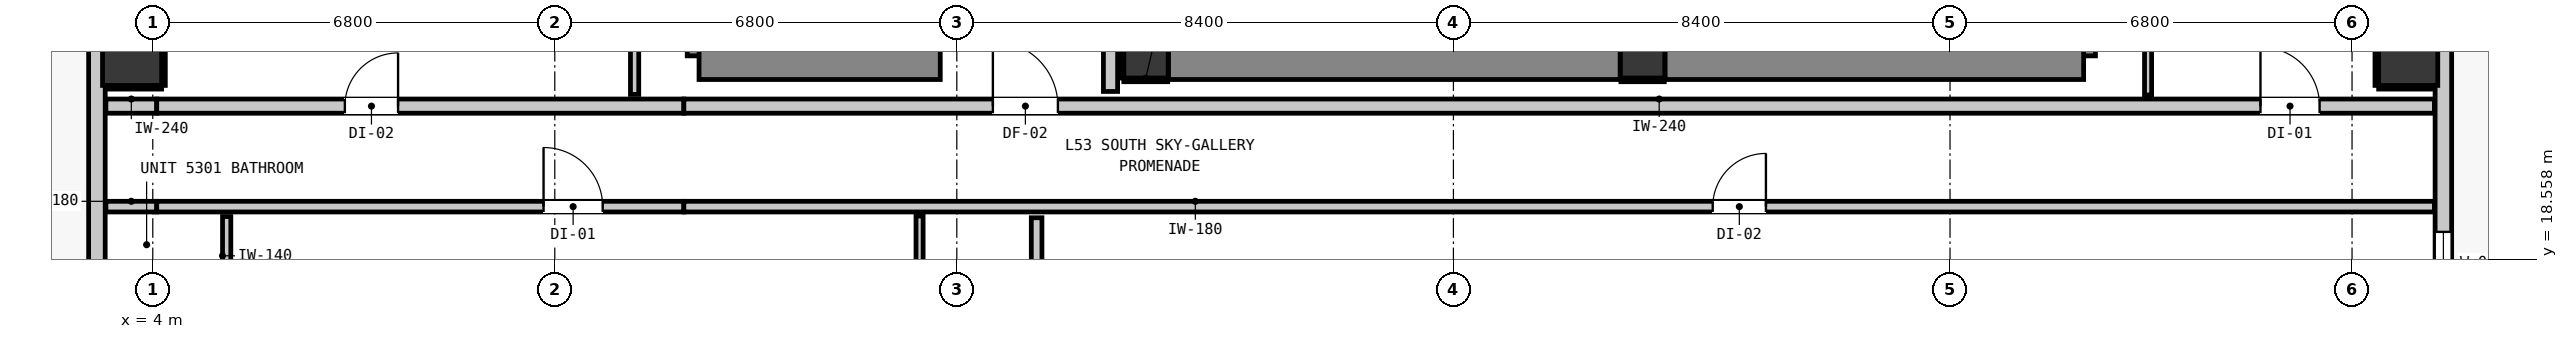
"""IFC4 building model, lengths in metres.
Left out: names, types, materials, properties, quantities, classifications, styles, units other than length and angle.
Written with IfcOpenShell. Run it as: python <this file> out.ifc"""

import sys

from ifc_helpers import new_model, si_unit, direction, frame, frame_2d, origin, origin_2d, place, context, subcontext, project, spatial, rectangle, extrude, element, fill, save


model = new_model("IFC4")
c1 = context("Model", 3, precision=1e-05, world=origin(), true_north=direction((0.0, 1.0)))
c2 = subcontext(c1, "Body", "Model", "MODEL_VIEW")
j1 = project(units=[si_unit("LENGTHUNIT", "METRE"), si_unit("PLANEANGLEUNIT", "RADIAN")], contexts=[c1])
p1 = place(None, origin())
s1 = spatial("IfcSite", under=j1, at=p1, CompositionType="ELEMENT")
p2 = place(p1, origin())
s2 = spatial("IfcBuilding", under=s1, at=p2, CompositionType="ELEMENT")
p3 = place(p2, frame((0.0, 0.0, 183.52)))
s3 = spatial("IfcBuildingStorey", under=s2, at=p3, CompositionType="ELEMENT", Elevation=183.52)
for number, where, z_axis, x_axis in (
    (1, (20.8, 22.0, 0.0), (0.0, 0.0, 1.0), (1.0, 0.0, 0.0)),
    (2, (29.2, 22.0, 0.0), (0.0, 0.0, 1.0), (1.0, 0.0, 0.0)),
):
    element("IfcColumn", number, at=place(p3, frame(where, z_axis=z_axis, x_axis=x_axis)), inside=s3, PredefinedType="COLUMN", context=c2, shape_type="SweptSolid", body=[
        extrude(rectangle(XDim=0.75, YDim=0.75, at=origin_2d()), origin(), (0.0, 0.0, 1.0), 3.32),
    ])
p4 = place(p3, frame((13.44, 22.0, 0.0), z_axis=(0.0, 0.0, 1.0), x_axis=(0.0, 1.0, 0.0)))
e3 = element("IfcWall", 3, at=p4, inside=s3, PredefinedType="SHEAR", context=c2, shape_type="SweptSolid", body=[
    extrude(rectangle(XDim=8.32, YDim=0.8, at=frame_2d((4.16, 0.0))), origin(), (0.0, 0.0, 1.0), 3.32),
])
p5 = place(p3, frame((13.24, 22.0, 0.0), z_axis=(0.0, 0.0, 1.0), x_axis=(1.0, 0.0, 0.0)))
e4 = element("IfcWall", 4, at=p5, inside=s3, PredefinedType="SHEAR", context=c2, shape_type="SweptSolid", body=[
    extrude(rectangle(XDim=4.08, YDim=0.8, at=frame_2d((2.04, 0.0))), origin(), (0.0, 0.0, 1.0), 3.32),
])
p6 = place(p3, frame((36.46, 22.0, 0.0), z_axis=(0.0, 0.0, 1.0), x_axis=(0.0, 1.0, 0.0)))
e5 = element("IfcWall", 5, at=p6, inside=s3, PredefinedType="SHEAR", context=c2, shape_type="SweptSolid", body=[
    extrude(rectangle(XDim=8.32, YDim=0.8, at=frame_2d((4.16, 0.0))), origin(), (0.0, 0.0, 1.0), 3.32),
])
p7 = place(p3, frame((29.58, 22.0, 0.0), z_axis=(0.0, 0.0, 1.0), x_axis=(1.0, 0.0, 0.0)))
e6 = element("IfcWall", 6, at=p7, inside=s3, PredefinedType="SHEAR", context=c2, shape_type="SweptSolid", body=[
    extrude(rectangle(XDim=7.08, YDim=0.8, at=frame_2d((3.54, 0.0))), origin(), (0.0, 0.0, 1.0), 3.32),
])
p8 = place(p3, frame((21.18, 22.0, 0.0), z_axis=(0.0, 0.0, 1.0), x_axis=(1.0, 0.0, 0.0)))
e7 = element("IfcWall", 7, at=p8, inside=s3, PredefinedType="SHEAR", context=c2, shape_type="SweptSolid", body=[
    extrude(rectangle(XDim=7.64, YDim=0.8, at=frame_2d((3.82, 0.0))), origin(), (0.0, 0.0, 1.0), 3.32),
])
for number, where, z_axis, x_axis in (
    (8, (3.65, 22.0, 0.0), (0.0, 0.0, 1.0), (1.0, 0.0, 0.0)),
    (9, (42.15, 22.0, 0.0), (0.0, 0.0, 1.0), (1.0, 0.0, 0.0)),
):
    element("IfcColumn", number, at=place(p3, frame(where, z_axis=z_axis, x_axis=x_axis)), inside=s3, PredefinedType="COLUMN", context=c2, shape_type="SweptSolid", body=[
        extrude(rectangle(XDim=1.0, YDim=1.0, at=origin_2d()), origin(), (0.0, 0.0, 1.0), 3.32),
    ])
p9 = place(p3, frame((3.055, 17.555, 0.0), z_axis=(0.0, 0.0, 1.0), x_axis=(0.0, 1.0, 0.0)))
e10 = element("IfcWall", 10, at=p9, inside=s3, PredefinedType="STANDARD", context=c2, shape_type="SweptSolid", body=[
    extrude(rectangle(XDim=32.29, YDim=0.28, at=frame_2d((16.145, 0.0))), origin(), (0.0, 0.0, 1.0), 3.08),
])
p10 = place(p9, frame((5.467, 0.0, 0.0)))
e11 = element("IfcOpeningElement", 11, at=p10, cuts=e10, PredefinedType="OPENING", context=c2, shape_type="SweptSolid", body=[
    extrude(rectangle(XDim=1.0, YDim=2.15, at=frame_2d((0.5, 1.075))), frame((0.0, 0.15, 0.0), z_axis=(0.0, -1.0, 0.0), x_axis=(1.0, 0.0, 0.0)), (0.0, 0.0, 1.0), 0.3),
])
p11 = place(p9, frame((30.247, 0.0, 0.85)))
e12 = element("IfcOpeningElement", 12, at=p11, cuts=e10, PredefinedType="OPENING", context=c2, shape_type="SweptSolid", body=[
    extrude(rectangle(XDim=1.05, YDim=1.65, at=frame_2d((0.525, 0.825))), frame((0.0, 0.15, 0.0), z_axis=(0.0, -1.0, 0.0), x_axis=(1.0, 0.0, 0.0)), (0.0, 0.0, 1.0), 0.3),
])
p12 = place(p9, frame((9.131, 0.0, 0.85)))
e13 = element("IfcOpeningElement", 13, at=p12, cuts=e10, PredefinedType="OPENING", context=c2, shape_type="SweptSolid", body=[
    extrude(rectangle(XDim=1.05, YDim=1.65, at=frame_2d((0.525, 0.825))), frame((0.0, 0.15, 0.0), z_axis=(0.0, -1.0, 0.0), x_axis=(1.0, 0.0, 0.0)), (0.0, 0.0, 1.0), 0.3),
])
p13 = place(p3, frame((42.745, 49.845, 0.0), z_axis=(0.0, 0.0, 1.0), x_axis=(0.0, -1.0, 0.0)))
e14 = element("IfcWall", 14, at=p13, inside=s3, PredefinedType="STANDARD", context=c2, shape_type="SweptSolid", body=[
    extrude(rectangle(XDim=32.29, YDim=0.28, at=frame_2d((16.145, 0.0))), origin(), (0.0, 0.0, 1.0), 3.08),
])
p14 = place(p13, frame((0.904, 0.0, 0.0)))
e15 = element("IfcOpeningElement", 15, at=p14, cuts=e14, PredefinedType="OPENING", context=c2, shape_type="SweptSolid", body=[
    extrude(rectangle(XDim=1.0, YDim=2.15, at=frame_2d((0.5, 1.075))), frame((0.0, 0.15, 0.0), z_axis=(0.0, -1.0, 0.0), x_axis=(1.0, 0.0, 0.0)), (0.0, 0.0, 1.0), 0.3),
])
p15 = place(p13, frame((30.822, 0.0, 0.85)))
e16 = element("IfcOpeningElement", 16, at=p15, cuts=e14, PredefinedType="OPENING", context=c2, shape_type="SweptSolid", body=[
    extrude(rectangle(XDim=1.05, YDim=1.65, at=frame_2d((0.525, 0.825))), frame((0.0, 0.15, 0.0), z_axis=(0.0, -1.0, 0.0), x_axis=(1.0, 0.0, 0.0)), (0.0, 0.0, 1.0), 0.3),
])
p16 = place(p13, frame((4.424, 0.0, 0.85)))
e17 = element("IfcOpeningElement", 17, at=p16, cuts=e14, PredefinedType="OPENING", context=c2, shape_type="SweptSolid", body=[
    extrude(rectangle(XDim=1.05, YDim=1.65, at=frame_2d((0.525, 0.825))), frame((0.0, 0.15, 0.0), z_axis=(0.0, -1.0, 0.0), x_axis=(1.0, 0.0, 0.0)), (0.0, 0.0, 1.0), 0.3),
])
p17 = place(p13, frame((24.724, 0.0, 0.85)))
e18 = element("IfcOpeningElement", 18, at=p17, cuts=e14, PredefinedType="OPENING", context=c2, shape_type="SweptSolid", body=[
    extrude(rectangle(XDim=1.05, YDim=1.65, at=frame_2d((0.525, 0.825))), frame((0.0, 0.15, 0.0), z_axis=(0.0, -1.0, 0.0), x_axis=(1.0, 0.0, 0.0)), (0.0, 0.0, 1.0), 0.3),
])
p18 = place(p3, frame((3.207, 21.15, 0.0), z_axis=(0.0, 0.0, 1.0), x_axis=(1.0, 0.0, 0.0)))
e19 = element("IfcWall", 19, at=p18, inside=s3, PredefinedType="PARTITIONING", context=c2, shape_type="SweptSolid", body=[
    extrude(rectangle(XDim=0.86, YDim=0.24, at=frame_2d((0.43, 0.0))), origin(), (0.0, 0.0, 1.0), 3.08),
])
p19 = place(p3, frame((4.067, 21.15, 0.0), z_axis=(0.0, 0.0, 1.0), x_axis=(1.0, 0.0, 0.0)))
e20 = element("IfcWall", 20, at=p19, inside=s3, PredefinedType="PARTITIONING", context=c2, shape_type="SweptSolid", body=[
    extrude(rectangle(XDim=8.916, YDim=0.24, at=frame_2d((4.458, 0.0))), origin(), (0.0, 0.0, 1.0), 2.565),
])
p20 = place(p19, frame((3.182, 0.0, 0.0)))
e21 = element("IfcOpeningElement", 21, at=p20, cuts=e20, PredefinedType="OPENING", context=c2, shape_type="SweptSolid", body=[
    extrude(rectangle(XDim=0.9, YDim=2.1, at=frame_2d((0.45, 1.05))), frame((0.0, 0.13, 0.0), z_axis=(0.0, -1.0, 0.0), x_axis=(1.0, 0.0, 0.0)), (0.0, 0.0, 1.0), 0.26),
])
p21 = place(p3, frame((12.983, 21.15, 0.0), z_axis=(0.0, 0.0, 1.0), x_axis=(1.0, 0.0, 0.0)))
e22 = element("IfcWall", 22, at=p21, inside=s3, PredefinedType="PARTITIONING", context=c2, shape_type="SweptSolid", body=[
    extrude(rectangle(XDim=29.61, YDim=0.24, at=frame_2d((14.805, 0.0))), origin(), (0.0, 0.0, 1.0), 3.08),
])
p22 = place(p21, frame((5.227, 0.0, 0.0)))
e23 = element("IfcOpeningElement", 23, at=p22, cuts=e22, PredefinedType="OPENING", context=c2, shape_type="SweptSolid", body=[
    extrude(rectangle(XDim=1.1, YDim=2.15, at=frame_2d((0.55, 1.075))), frame((0.0, 0.13, 0.0), z_axis=(0.0, -1.0, 0.0), x_axis=(1.0, 0.0, 0.0)), (0.0, 0.0, 1.0), 0.26),
])
p23 = place(p21, frame((26.668, 0.0, 0.0)))
e24 = element("IfcOpeningElement", 24, at=p23, cuts=e22, PredefinedType="OPENING", context=c2, shape_type="SweptSolid", body=[
    extrude(rectangle(XDim=1.0, YDim=2.15, at=frame_2d((0.5, 1.075))), frame((0.0, 0.13, 0.0), z_axis=(0.0, -1.0, 0.0), x_axis=(1.0, 0.0, 0.0)), (0.0, 0.0, 1.0), 0.26),
])
p24 = place(p3, frame((3.207, 19.45, 0.0), z_axis=(0.0, 0.0, 1.0), x_axis=(1.0, 0.0, 0.0)))
e25 = element("IfcWall", 25, at=p24, inside=s3, PredefinedType="PARTITIONING", context=c2, shape_type="SweptSolid", body=[
    extrude(rectangle(XDim=0.86, YDim=0.18, at=frame_2d((0.43, 0.0))), origin(), (0.0, 0.0, 1.0), 3.08),
])
p25 = place(p3, frame((4.067, 19.45, 0.0), z_axis=(0.0, 0.0, 1.0), x_axis=(1.0, 0.0, 0.0)))
e26 = element("IfcWall", 26, at=p25, inside=s3, PredefinedType="PARTITIONING", context=c2, shape_type="SweptSolid", body=[
    extrude(rectangle(XDim=8.916, YDim=0.18, at=frame_2d((4.458, 0.0))), origin(), (0.0, 0.0, 1.0), 2.565),
])
p26 = place(p25, frame((6.543, 0.0, 0.0)))
e27 = element("IfcOpeningElement", 27, at=p26, cuts=e26, PredefinedType="OPENING", context=c2, shape_type="SweptSolid", body=[
    extrude(rectangle(XDim=1.0, YDim=2.15, at=frame_2d((0.5, 1.075))), frame((0.0, 0.1, 0.0), z_axis=(0.0, -1.0, 0.0), x_axis=(1.0, 0.0, 0.0)), (0.0, 0.0, 1.0), 0.2),
])
p27 = place(p3, frame((12.983, 19.45, 0.0), z_axis=(0.0, 0.0, 1.0), x_axis=(1.0, 0.0, 0.0)))
e28 = element("IfcWall", 28, at=p27, inside=s3, PredefinedType="PARTITIONING", context=c2, shape_type="SweptSolid", body=[
    extrude(rectangle(XDim=29.61, YDim=0.18, at=frame_2d((14.805, 0.0))), origin(), (0.0, 0.0, 1.0), 3.08),
])
p28 = place(p27, frame((17.403, 0.0, 0.0)))
e29 = element("IfcOpeningElement", 29, at=p28, cuts=e28, PredefinedType="OPENING", context=c2, shape_type="SweptSolid", body=[
    extrude(rectangle(XDim=0.9, YDim=2.1, at=frame_2d((0.45, 1.05))), frame((0.0, 0.1, 0.0), z_axis=(0.0, -1.0, 0.0), x_axis=(1.0, 0.0, 0.0)), (0.0, 0.0, 1.0), 0.2),
])
p29 = place(p3, frame((20.2, 21.398, 0.0), z_axis=(0.0, 0.0, 1.0), x_axis=(0.0, 1.0, 0.0)))
e30 = element("IfcWall", 30, at=p29, inside=s3, PredefinedType="PARTITIONING", context=c2, shape_type="SweptSolid", body=[
    extrude(rectangle(XDim=6.754, YDim=0.24, at=frame_2d((3.377, 0.0))), origin(), (0.0, 0.0, 1.0), 3.08),
])
p30 = place(p3, frame((18.95, 15.407, 0.0), z_axis=(0.0, 0.0, 1.0), x_axis=(0.0, 1.0, 0.0)))
e31 = element("IfcWall", 31, at=p30, inside=s3, PredefinedType="PARTITIONING", context=c2, shape_type="SweptSolid", body=[
    extrude(rectangle(XDim=3.855, YDim=0.18, at=frame_2d((1.927, 0.0))), origin(), (0.0, 0.0, 1.0), 3.08),
])
p31 = place(p3, frame((5.25, 15.575, 0.0), z_axis=(0.0, 0.0, 1.0), x_axis=(0.0, 1.0, 0.0)))
e32 = element("IfcWall", 32, at=p31, inside=s3, PredefinedType="PARTITIONING", context=c2, shape_type="SweptSolid", body=[
    extrude(rectangle(XDim=3.707, YDim=0.14, at=frame_2d((1.854, 0.0))), origin(), (0.0, 0.0, 1.0), 3.08),
])
p32 = place(p31, frame((1.42, 0.0, 0.0)))
e33 = element("IfcOpeningElement", 33, at=p32, cuts=e32, PredefinedType="OPENING", context=c2, shape_type="SweptSolid", body=[
    extrude(rectangle(XDim=0.86, YDim=2.02, at=frame_2d((0.43, 1.01))), frame((0.0, 0.08, 0.0), z_axis=(0.0, -1.0, 0.0), x_axis=(1.0, 0.0, 0.0)), (0.0, 0.0, 1.0), 0.16),
])
p33 = place(p3, frame((12.15, 21.348, 0.0), z_axis=(0.0, 0.0, 1.0), x_axis=(0.0, 1.0, 0.0)))
e34 = element("IfcWall", 34, at=p33, inside=s3, PredefinedType="PARTITIONING", context=c2, shape_type="SweptSolid", body=[
    extrude(rectangle(XDim=13.004, YDim=0.14, at=frame_2d((6.502, 0.0))), origin(), (0.0, 0.0, 1.0), 3.08),
])
p34 = place(p3, frame((16.97, 15.407, 0.0), z_axis=(0.0, 0.0, 1.0), x_axis=(0.0, 1.0, 0.0)))
e35 = element("IfcWall", 35, at=p34, inside=s3, PredefinedType="PARTITIONING", context=c2, shape_type="SweptSolid", body=[
    extrude(rectangle(XDim=3.885, YDim=0.12, at=frame_2d((1.942, 0.0))), origin(), (0.0, 0.0, 1.0), 3.08),
])
p35 = place(p34, frame((1.568, 0.0, 0.0)))
e36 = element("IfcOpeningElement", 36, at=p35, cuts=e35, PredefinedType="OPENING", context=c2, shape_type="SweptSolid", body=[
    extrude(rectangle(XDim=0.9, YDim=2.1, at=frame_2d((0.45, 1.05))), frame((0.0, 0.07, 0.0), z_axis=(0.0, -1.0, 0.0), x_axis=(1.0, 0.0, 0.0)), (0.0, 0.0, 1.0), 0.14),
])
p36 = place(p3, frame((37.75, 21.338, 0.0), z_axis=(0.0, 0.0, 1.0), x_axis=(0.0, 1.0, 0.0)))
e37 = element("IfcWall", 37, at=p36, inside=s3, PredefinedType="PARTITIONING", context=c2, shape_type="SweptSolid", body=[
    extrude(rectangle(XDim=5.316, YDim=0.12, at=frame_2d((2.658, 0.0))), origin(), (0.0, 0.0, 1.0), 3.08),
])
p37 = place(p3, frame((20.425, 21.593, 0.0), z_axis=(0.0, 0.0, 1.0), x_axis=(1.0, 0.0, 0.0)))
e38 = element("IfcWall", 38, at=p37, inside=s3, PredefinedType="PARTITIONING", context=c2, shape_type="SweptSolid", body=[
    extrude(rectangle(XDim=0.742, YDim=0.06, at=frame_2d((0.371, 0.0))), origin(), (0.0, 0.0, 1.0), 1.45),
])
p38 = place(p3, frame((20.393, 21.625, 0.0), z_axis=(0.0, 0.0, 1.0), x_axis=(0.0, 1.0, 0.0)))
e39 = element("IfcWall", 39, at=p38, inside=s3, PredefinedType="PARTITIONING", context=c2, shape_type="SweptSolid", body=[
    extrude(rectangle(XDim=0.75, YDim=0.06, at=frame_2d((0.375, 0.0))), origin(), (0.0, 0.0, 1.0), 1.45),
])
p39 = place(p3, frame((28.833, 21.593, 0.0), z_axis=(0.0, 0.0, 1.0), x_axis=(1.0, 0.0, 0.0)))
e40 = element("IfcWall", 40, at=p39, inside=s3, PredefinedType="PARTITIONING", context=c2, shape_type="SweptSolid", body=[
    extrude(rectangle(XDim=0.734, YDim=0.06, at=frame_2d((0.367, 0.0))), origin(), (0.0, 0.0, 1.0), 1.45),
])
p40 = place(p3, frame((3.21, 21.468, 0.0), z_axis=(0.0, 0.0, 1.0), x_axis=(1.0, 0.0, 0.0)))
e41 = element("IfcWall", 41, at=p40, inside=s3, PredefinedType="PARTITIONING", context=c2, shape_type="SweptSolid", body=[
    extrude(rectangle(XDim=0.94, YDim=0.06, at=frame_2d((0.47, 0.0))), origin(), (0.0, 0.0, 1.0), 1.45),
])
p41 = place(p3, frame((4.182, 21.5, 0.0), z_axis=(0.0, 0.0, 1.0), x_axis=(0.0, 1.0, 0.0)))
e42 = element("IfcWall", 42, at=p41, inside=s3, PredefinedType="PARTITIONING", context=c2, shape_type="SweptSolid", body=[
    extrude(rectangle(XDim=1.0, YDim=0.06, at=frame_2d((0.5, 0.0))), origin(), (0.0, 0.0, 1.0), 1.45),
])
p42 = place(p3, frame((41.65, 21.468, 0.0), z_axis=(0.0, 0.0, 1.0), x_axis=(1.0, 0.0, 0.0)))
e43 = element("IfcWall", 43, at=p42, inside=s3, PredefinedType="PARTITIONING", context=c2, shape_type="SweptSolid", body=[
    extrude(rectangle(XDim=0.94, YDim=0.06, at=frame_2d((0.47, 0.0))), origin(), (0.0, 0.0, 1.0), 1.45),
])
p43 = place(p3, frame((41.618, 21.5, 0.0), z_axis=(0.0, 0.0, 1.0), x_axis=(0.0, 1.0, 0.0)))
e44 = element("IfcWall", 44, at=p43, inside=s3, PredefinedType="PARTITIONING", context=c2, shape_type="SweptSolid", body=[
    extrude(rectangle(XDim=1.0, YDim=0.06, at=frame_2d((0.5, 0.0))), origin(), (0.0, 0.0, 1.0), 1.45),
])
p44 = place(p15, origin())
e45 = element("IfcWindow", 45, at=p44, inside=s3, PartitioningType="SINGLE_PANEL", PredefinedType="WINDOW", context=c2, shape_type="SweptSolid", body=[
    extrude(rectangle(XDim=1.05, YDim=1.65, at=frame_2d((0.525, 0.825))), frame((0.0, 0.03, 0.0), z_axis=(0.0, -1.0, 0.0), x_axis=(1.0, 0.0, 0.0)), (0.0, 0.0, 1.0), 0.06),
])
fill(e16, e45)
p45 = place(p22, origin())
e46 = element("IfcDoor", 46, at=p45, inside=s3, OperationType="SINGLE_SWING_LEFT", PredefinedType="DOOR", context=c2, shape_type="SweptSolid", body=[
    extrude(rectangle(XDim=1.1, YDim=2.15, at=frame_2d((0.55, 1.075))), frame((0.0, 0.025, 0.0), z_axis=(0.0, -1.0, 0.0), x_axis=(1.0, 0.0, 0.0)), (0.0, 0.0, 1.0), 0.05),
])
fill(e23, e46)
p46 = place(p26, origin())
e47 = element("IfcDoor", 47, at=p46, inside=s3, OperationType="SINGLE_SWING_LEFT", PredefinedType="DOOR", context=c2, shape_type="SweptSolid", body=[
    extrude(rectangle(XDim=1.0, YDim=2.15, at=frame_2d((0.5, 1.075))), frame((0.0, 0.025, 0.0), z_axis=(0.0, -1.0, 0.0), x_axis=(1.0, 0.0, 0.0)), (0.0, 0.0, 1.0), 0.05),
])
fill(e27, e47)
p47 = place(p28, origin())
e48 = element("IfcDoor", 48, at=p47, inside=s3, OperationType="SINGLE_SWING_RIGHT", PredefinedType="DOOR", context=c2, shape_type="SweptSolid", body=[
    extrude(rectangle(XDim=0.9, YDim=2.1, at=frame_2d((0.45, 1.05))), frame((0.0, 0.025, 0.0), z_axis=(0.0, -1.0, 0.0), x_axis=(1.0, 0.0, 0.0)), (0.0, 0.0, 1.0), 0.05),
])
fill(e29, e48)
p48 = place(p20, origin())
e49 = element("IfcDoor", 49, at=p48, inside=s3, OperationType="SINGLE_SWING_RIGHT", PredefinedType="DOOR", context=c2, shape_type="SweptSolid", body=[
    extrude(rectangle(XDim=0.9, YDim=2.1, at=frame_2d((0.45, 1.05))), frame((0.0, 0.025, 0.0), z_axis=(0.0, -1.0, 0.0), x_axis=(1.0, 0.0, 0.0)), (0.0, 0.0, 1.0), 0.05),
])
fill(e21, e49)
p49 = place(p23, origin())
e50 = element("IfcDoor", 50, at=p49, inside=s3, OperationType="SINGLE_SWING_LEFT", PredefinedType="DOOR", context=c2, shape_type="SweptSolid", body=[
    extrude(rectangle(XDim=1.0, YDim=2.15, at=frame_2d((0.5, 1.075))), frame((0.0, 0.025, 0.0), z_axis=(0.0, -1.0, 0.0), x_axis=(1.0, 0.0, 0.0)), (0.0, 0.0, 1.0), 0.05),
])
fill(e24, e50)
save(model, sys.argv[1])
